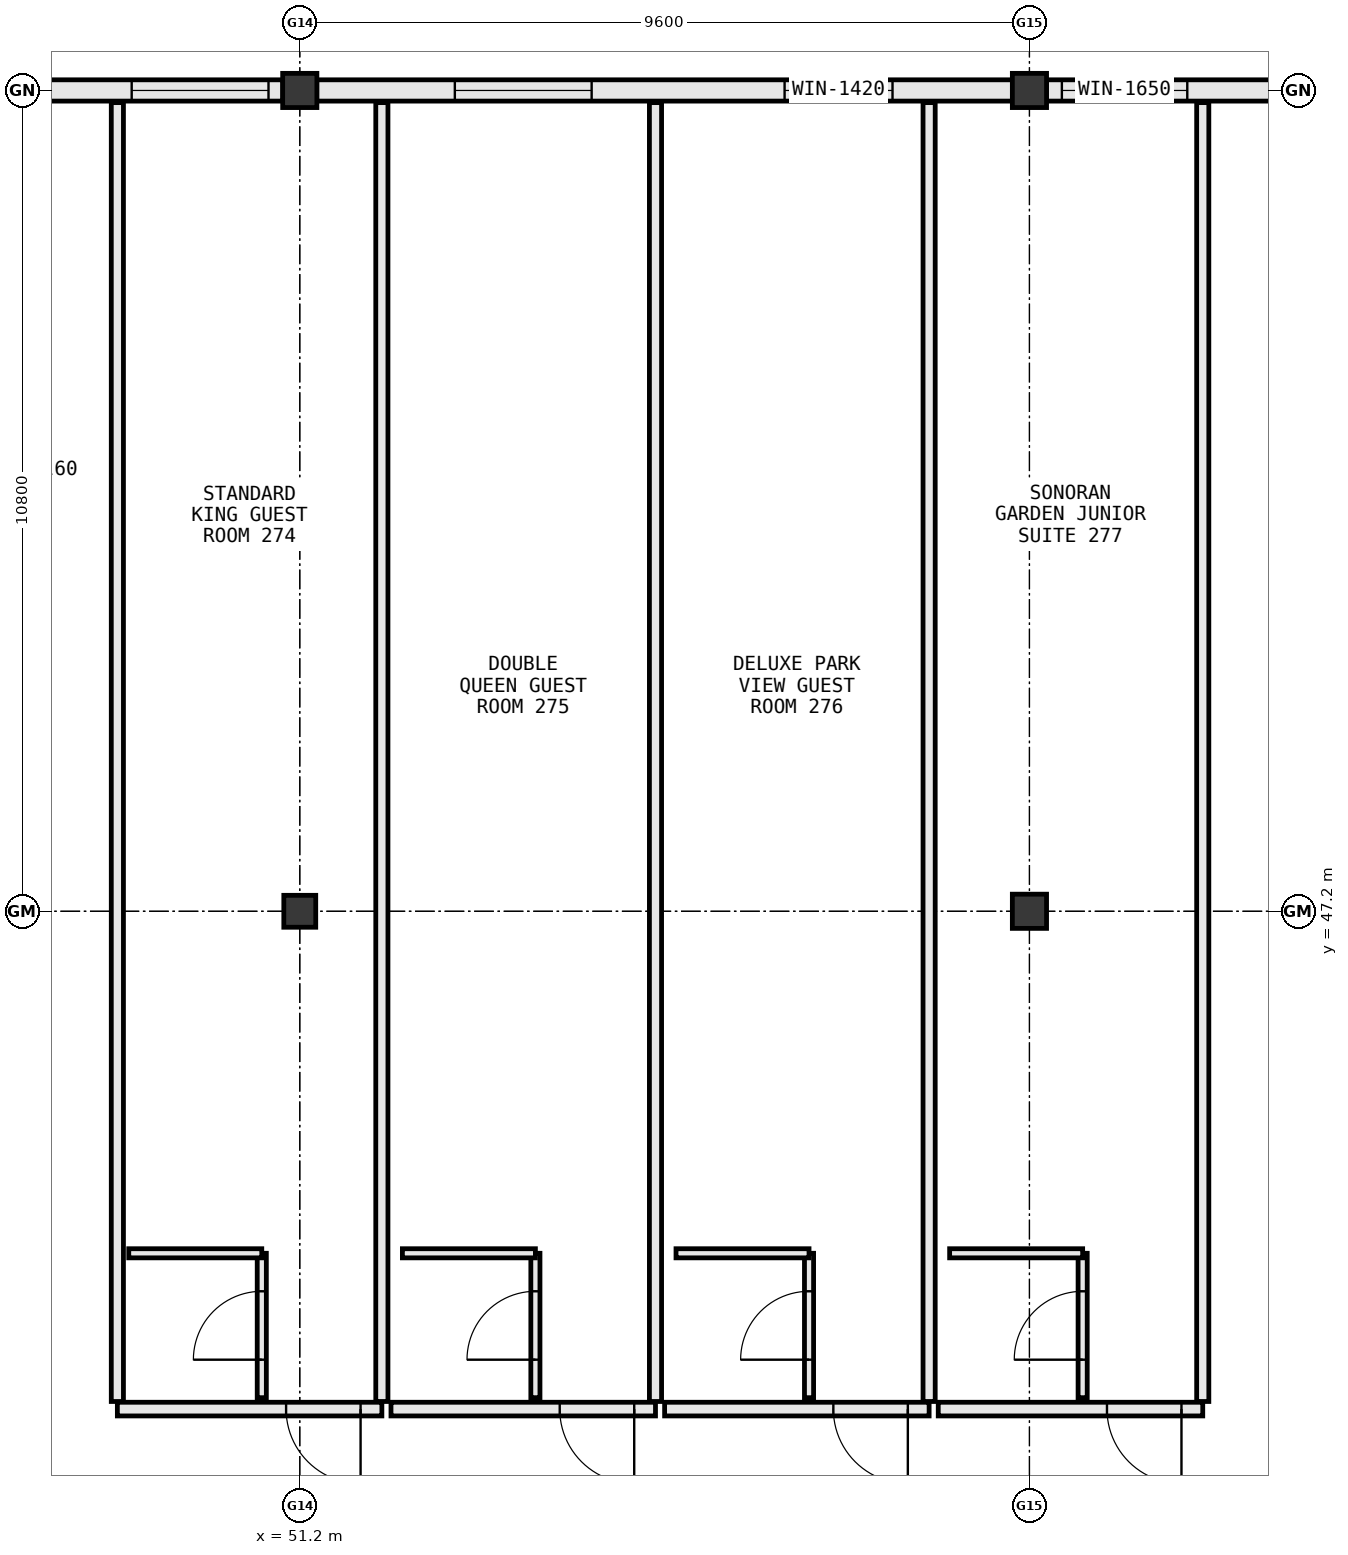
"""IFC4 building model, lengths in metres.
Left out: names, types, materials, properties, quantities, classifications, styles, units other than length and angle.
Written with IfcOpenShell. Run it as: python <this file> out.ifc"""

import sys

from ifc_helpers import new_model, si_unit, direction, frame, frame_2d, origin, origin_2d, place, context, subcontext, project, spatial, rectangle, extrude, element, fill, save


model = new_model("IFC4")
c1 = context("Model", 3, precision=1e-05, world=origin(), true_north=direction((0.0, 1.0)))
c2 = subcontext(c1, "Body", "Model", "MODEL_VIEW")
j1 = project(units=[si_unit("LENGTHUNIT", "METRE"), si_unit("PLANEANGLEUNIT", "RADIAN")], contexts=[c1])
p1 = place(None, origin())
s1 = spatial("IfcSite", under=j1, at=p1, CompositionType="ELEMENT")
p2 = place(p1, origin())
s2 = spatial("IfcBuilding", under=s1, at=p2, CompositionType="ELEMENT")
p3 = place(p2, frame((0.0, 0.0, 39.0)))
s3 = spatial("IfcBuildingStorey", under=s2, at=p3, CompositionType="ELEMENT", Elevation=39.0)
for number, where, z_axis, x_axis in (
    (1, (60.8, 47.2, 0.0), (0.0, 0.0, 1.0), (1.0, 0.0, 0.0)),
    (2, (60.8, 58.0, 0.0), (0.0, 0.0, 1.0), (1.0, 0.0, 0.0)),
):
    element("IfcColumn", number, at=place(p3, frame(where, z_axis=z_axis, x_axis=x_axis)), inside=s3, PredefinedType="COLUMN", context=c2, shape_type="SweptSolid", body=[
        extrude(rectangle(XDim=0.45, YDim=0.45, at=origin_2d()), origin(), (0.0, 0.0, 1.0), 3.8),
    ])
p4 = place(p3, frame((51.2, 47.2, 0.0), z_axis=(0.0, 0.0, 1.0), x_axis=(1.0, 0.0, 0.0)))
e3 = element("IfcColumn", 3, at=p4, inside=s3, PredefinedType="COLUMN", context=c2, shape_type="SweptSolid", body=[
    extrude(rectangle(XDim=0.42, YDim=0.42, at=origin_2d()), origin(), (0.0, 0.0, 1.0), 3.8),
])
p5 = place(p3, frame((51.2, 58.0, 0.0), z_axis=(0.0, 0.0, 1.0), x_axis=(1.0, 0.0, 0.0)))
e4 = element("IfcColumn", 4, at=p5, inside=s3, PredefinedType="COLUMN", context=c2, shape_type="SweptSolid", body=[
    extrude(rectangle(XDim=0.45, YDim=0.45, at=origin_2d()), origin(), (0.0, 0.0, 1.0), 3.8),
])
p6 = place(p3, frame((65.377, 58.0, 0.0), z_axis=(0.0, 0.0, 1.0), x_axis=(-1.0, 0.0, 0.0)))
e5 = element("IfcWall", 5, at=p6, inside=s3, PredefinedType="STANDARD", context=c2, shape_type="SweptSolid", body=[
    extrude(rectangle(XDim=4.354, YDim=0.28, at=frame_2d((2.177, 0.0))), origin(), (0.0, 0.0, 1.0), 2.88),
])
p7 = place(p6, frame((2.5, 0.0, 0.85)))
e6 = element("IfcOpeningElement", 6, at=p7, cuts=e5, PredefinedType="OPENING", context=c2, shape_type="SweptSolid", body=[
    extrude(rectangle(XDim=1.65, YDim=1.8, at=frame_2d((0.825, 0.9))), frame((0.0, 0.152, 0.0), z_axis=(0.0, -1.0, 0.0), x_axis=(1.0, 0.0, 0.0)), (0.0, 0.0, 1.0), 0.304),
])
p8 = place(p3, frame((60.577, 58.0, 0.0), z_axis=(0.0, 0.0, 1.0), x_axis=(-1.0, 0.0, 0.0)))
e7 = element("IfcWall", 7, at=p8, inside=s3, PredefinedType="STANDARD", context=c2, shape_type="SweptSolid", body=[
    extrude(rectangle(XDim=9.154, YDim=0.28, at=frame_2d((4.577, 0.0))), origin(), (0.0, 0.0, 1.0), 2.88),
])
p9 = place(p8, frame((1.579, 0.0, 0.85)))
e8 = element("IfcOpeningElement", 8, at=p9, cuts=e7, PredefinedType="OPENING", context=c2, shape_type="SweptSolid", body=[
    extrude(rectangle(XDim=1.42, YDim=1.7, at=frame_2d((0.71, 0.85))), frame((0.0, 0.152, 0.0), z_axis=(0.0, -1.0, 0.0), x_axis=(1.0, 0.0, 0.0)), (0.0, 0.0, 1.0), 0.304),
])
p10 = place(p8, frame((5.537, 0.0, 0.85)))
e9 = element("IfcOpeningElement", 9, at=p10, cuts=e7, PredefinedType="OPENING", context=c2, shape_type="SweptSolid", body=[
    extrude(rectangle(XDim=1.8, YDim=1.85, at=frame_2d((0.9, 0.925))), frame((0.0, 0.152, 0.0), z_axis=(0.0, -1.0, 0.0), x_axis=(1.0, 0.0, 0.0)), (0.0, 0.0, 1.0), 0.304),
])
p11 = place(p3, frame((50.977, 58.0, 0.0), z_axis=(0.0, 0.0, 1.0), x_axis=(-1.0, 0.0, 0.0)))
e10 = element("IfcWall", 10, at=p11, inside=s3, PredefinedType="STANDARD", context=c2, shape_type="SweptSolid", body=[
    extrude(rectangle(XDim=4.354, YDim=0.28, at=frame_2d((2.177, 0.0))), origin(), (0.0, 0.0, 1.0), 2.88),
])
p12 = place(p11, frame((0.188, 0.0, 0.85)))
e11 = element("IfcOpeningElement", 11, at=p12, cuts=e10, PredefinedType="OPENING", context=c2, shape_type="SweptSolid", body=[
    extrude(rectangle(XDim=1.8, YDim=1.85, at=frame_2d((0.9, 0.925))), frame((0.0, 0.152, 0.0), z_axis=(0.0, -1.0, 0.0), x_axis=(1.0, 0.0, 0.0)), (0.0, 0.0, 1.0), 0.304),
])
p13 = place(p3, frame((48.8, 40.65, 0.0), z_axis=(0.0, 0.0, 1.0), x_axis=(1.0, 0.0, 0.0)))
e12 = element("IfcWall", 12, at=p13, inside=s3, PredefinedType="PARTITIONING", context=c2, shape_type="SweptSolid", body=[
    extrude(rectangle(XDim=3.48, YDim=0.18, at=frame_2d((1.74, 0.0))), origin(), (0.0, 0.0, 1.0), 3.565),
])
p14 = place(p13, frame((2.22, 0.0, 0.0)))
e13 = element("IfcOpeningElement", 13, at=p14, cuts=e12, PredefinedType="OPENING", context=c2, shape_type="SweptSolid", body=[
    extrude(rectangle(XDim=0.98, YDim=2.18, at=frame_2d((0.49, 1.09))), frame((0.0, 0.102, 0.0), z_axis=(0.0, -1.0, 0.0), x_axis=(1.0, 0.0, 0.0)), (0.0, 0.0, 1.0), 0.204),
])
p15 = place(p3, frame((48.8, 40.75, 0.0), z_axis=(0.0, 0.0, 1.0), x_axis=(0.0, 1.0, 0.0)))
e14 = element("IfcWall", 14, at=p15, inside=s3, PredefinedType="PARTITIONING", context=c2, shape_type="SweptSolid", body=[
    extrude(rectangle(XDim=17.09, YDim=0.16, at=frame_2d((8.545, 0.0))), origin(), (0.0, 0.0, 1.0), 3.11),
])
p16 = place(p3, frame((52.28, 40.75, 0.0), z_axis=(0.0, 0.0, 1.0), x_axis=(0.0, 1.0, 0.0)))
e15 = element("IfcWall", 15, at=p16, inside=s3, PredefinedType="PARTITIONING", context=c2, shape_type="SweptSolid", body=[
    extrude(rectangle(XDim=17.09, YDim=0.16, at=frame_2d((8.545, 0.0))), origin(), (0.0, 0.0, 1.0), 3.565),
])
p17 = place(p3, frame((50.7, 40.8, 0.0), z_axis=(0.0, 0.0, 1.0), x_axis=(0.0, 1.0, 0.0)))
e16 = element("IfcWall", 16, at=p17, inside=s3, PredefinedType="PARTITIONING", context=c2, shape_type="SweptSolid", body=[
    extrude(rectangle(XDim=1.9, YDim=0.12, at=frame_2d((0.95, 0.0))), origin(), (0.0, 0.0, 1.0), 3.565),
])
p18 = place(p17, frame((0.5, 0.0, 0.0)))
e17 = element("IfcOpeningElement", 17, at=p18, cuts=e16, PredefinedType="OPENING", context=c2, shape_type="SweptSolid", body=[
    extrude(rectangle(XDim=0.9, YDim=2.15, at=frame_2d((0.45, 1.075))), frame((0.0, 0.072, 0.0), z_axis=(0.0, -1.0, 0.0), x_axis=(1.0, 0.0, 0.0)), (0.0, 0.0, 1.0), 0.144),
])
p19 = place(p3, frame((48.95, 42.7, 0.0), z_axis=(0.0, 0.0, 1.0), x_axis=(1.0, 0.0, 0.0)))
e18 = element("IfcWall", 18, at=p19, inside=s3, PredefinedType="PARTITIONING", context=c2, shape_type="SweptSolid", body=[
    extrude(rectangle(XDim=1.75, YDim=0.12, at=frame_2d((0.875, 0.0))), origin(), (0.0, 0.0, 1.0), 3.565),
])
p20 = place(p3, frame((52.4, 40.65, 0.0), z_axis=(0.0, 0.0, 1.0), x_axis=(1.0, 0.0, 0.0)))
e19 = element("IfcWall", 19, at=p20, inside=s3, PredefinedType="PARTITIONING", context=c2, shape_type="SweptSolid", body=[
    extrude(rectangle(XDim=3.48, YDim=0.18, at=frame_2d((1.74, 0.0))), origin(), (0.0, 0.0, 1.0), 3.565),
])
p21 = place(p20, frame((2.22, 0.0, 0.0)))
e20 = element("IfcOpeningElement", 20, at=p21, cuts=e19, PredefinedType="OPENING", context=c2, shape_type="SweptSolid", body=[
    extrude(rectangle(XDim=0.98, YDim=2.18, at=frame_2d((0.49, 1.09))), frame((0.0, 0.102, 0.0), z_axis=(0.0, -1.0, 0.0), x_axis=(1.0, 0.0, 0.0)), (0.0, 0.0, 1.0), 0.204),
])
p22 = place(p3, frame((55.88, 40.75, 0.0), z_axis=(0.0, 0.0, 1.0), x_axis=(0.0, 1.0, 0.0)))
e21 = element("IfcWall", 21, at=p22, inside=s3, PredefinedType="PARTITIONING", context=c2, shape_type="SweptSolid", body=[
    extrude(rectangle(XDim=17.09, YDim=0.16, at=frame_2d((8.545, 0.0))), origin(), (0.0, 0.0, 1.0), 3.565),
])
p23 = place(p3, frame((54.3, 40.8, 0.0), z_axis=(0.0, 0.0, 1.0), x_axis=(0.0, 1.0, 0.0)))
e22 = element("IfcWall", 22, at=p23, inside=s3, PredefinedType="PARTITIONING", context=c2, shape_type="SweptSolid", body=[
    extrude(rectangle(XDim=1.9, YDim=0.12, at=frame_2d((0.95, 0.0))), origin(), (0.0, 0.0, 1.0), 3.11),
])
p24 = place(p23, frame((0.5, 0.0, 0.0)))
e23 = element("IfcOpeningElement", 23, at=p24, cuts=e22, PredefinedType="OPENING", context=c2, shape_type="SweptSolid", body=[
    extrude(rectangle(XDim=0.9, YDim=2.15, at=frame_2d((0.45, 1.075))), frame((0.0, 0.072, 0.0), z_axis=(0.0, -1.0, 0.0), x_axis=(1.0, 0.0, 0.0)), (0.0, 0.0, 1.0), 0.144),
])
p25 = place(p3, frame((52.55, 42.7, 0.0), z_axis=(0.0, 0.0, 1.0), x_axis=(1.0, 0.0, 0.0)))
e24 = element("IfcWall", 24, at=p25, inside=s3, PredefinedType="PARTITIONING", context=c2, shape_type="SweptSolid", body=[
    extrude(rectangle(XDim=1.75, YDim=0.12, at=frame_2d((0.875, 0.0))), origin(), (0.0, 0.0, 1.0), 3.565),
])
p26 = place(p3, frame((56.0, 40.65, 0.0), z_axis=(0.0, 0.0, 1.0), x_axis=(1.0, 0.0, 0.0)))
e25 = element("IfcWall", 25, at=p26, inside=s3, PredefinedType="PARTITIONING", context=c2, shape_type="SweptSolid", body=[
    extrude(rectangle(XDim=3.48, YDim=0.18, at=frame_2d((1.74, 0.0))), origin(), (0.0, 0.0, 1.0), 3.565),
])
p27 = place(p26, frame((2.22, 0.0, 0.0)))
e26 = element("IfcOpeningElement", 26, at=p27, cuts=e25, PredefinedType="OPENING", context=c2, shape_type="SweptSolid", body=[
    extrude(rectangle(XDim=0.98, YDim=2.18, at=frame_2d((0.49, 1.09))), frame((0.0, 0.102, 0.0), z_axis=(0.0, -1.0, 0.0), x_axis=(1.0, 0.0, 0.0)), (0.0, 0.0, 1.0), 0.204),
])
p28 = place(p3, frame((59.48, 40.75, 0.0), z_axis=(0.0, 0.0, 1.0), x_axis=(0.0, 1.0, 0.0)))
e27 = element("IfcWall", 27, at=p28, inside=s3, PredefinedType="PARTITIONING", context=c2, shape_type="SweptSolid", body=[
    extrude(rectangle(XDim=17.09, YDim=0.16, at=frame_2d((8.545, 0.0))), origin(), (0.0, 0.0, 1.0), 3.565),
])
p29 = place(p3, frame((57.9, 40.8, 0.0), z_axis=(0.0, 0.0, 1.0), x_axis=(0.0, 1.0, 0.0)))
e28 = element("IfcWall", 28, at=p29, inside=s3, PredefinedType="PARTITIONING", context=c2, shape_type="SweptSolid", body=[
    extrude(rectangle(XDim=1.9, YDim=0.12, at=frame_2d((0.95, 0.0))), origin(), (0.0, 0.0, 1.0), 3.11),
])
p30 = place(p29, frame((0.5, 0.0, 0.0)))
e29 = element("IfcOpeningElement", 29, at=p30, cuts=e28, PredefinedType="OPENING", context=c2, shape_type="SweptSolid", body=[
    extrude(rectangle(XDim=0.9, YDim=2.15, at=frame_2d((0.45, 1.075))), frame((0.0, 0.072, 0.0), z_axis=(0.0, -1.0, 0.0), x_axis=(1.0, 0.0, 0.0)), (0.0, 0.0, 1.0), 0.144),
])
p31 = place(p3, frame((56.15, 42.7, 0.0), z_axis=(0.0, 0.0, 1.0), x_axis=(1.0, 0.0, 0.0)))
e30 = element("IfcWall", 30, at=p31, inside=s3, PredefinedType="PARTITIONING", context=c2, shape_type="SweptSolid", body=[
    extrude(rectangle(XDim=1.75, YDim=0.12, at=frame_2d((0.875, 0.0))), origin(), (0.0, 0.0, 1.0), 3.565),
])
p32 = place(p3, frame((59.6, 40.65, 0.0), z_axis=(0.0, 0.0, 1.0), x_axis=(1.0, 0.0, 0.0)))
e31 = element("IfcWall", 31, at=p32, inside=s3, PredefinedType="PARTITIONING", context=c2, shape_type="SweptSolid", body=[
    extrude(rectangle(XDim=3.48, YDim=0.18, at=frame_2d((1.74, 0.0))), origin(), (0.0, 0.0, 1.0), 3.565),
])
p33 = place(p32, frame((2.22, 0.0, 0.0)))
e32 = element("IfcOpeningElement", 32, at=p33, cuts=e31, PredefinedType="OPENING", context=c2, shape_type="SweptSolid", body=[
    extrude(rectangle(XDim=0.98, YDim=2.18, at=frame_2d((0.49, 1.09))), frame((0.0, 0.102, 0.0), z_axis=(0.0, -1.0, 0.0), x_axis=(1.0, 0.0, 0.0)), (0.0, 0.0, 1.0), 0.204),
])
p34 = place(p3, frame((63.08, 40.75, 0.0), z_axis=(0.0, 0.0, 1.0), x_axis=(0.0, 1.0, 0.0)))
e33 = element("IfcWall", 33, at=p34, inside=s3, PredefinedType="PARTITIONING", context=c2, shape_type="SweptSolid", body=[
    extrude(rectangle(XDim=17.09, YDim=0.16, at=frame_2d((8.545, 0.0))), origin(), (0.0, 0.0, 1.0), 3.565),
])
p35 = place(p3, frame((61.5, 40.8, 0.0), z_axis=(0.0, 0.0, 1.0), x_axis=(0.0, 1.0, 0.0)))
e34 = element("IfcWall", 34, at=p35, inside=s3, PredefinedType="PARTITIONING", context=c2, shape_type="SweptSolid", body=[
    extrude(rectangle(XDim=1.9, YDim=0.12, at=frame_2d((0.95, 0.0))), origin(), (0.0, 0.0, 1.0), 3.565),
])
p36 = place(p35, frame((0.5, 0.0, 0.0)))
e35 = element("IfcOpeningElement", 35, at=p36, cuts=e34, PredefinedType="OPENING", context=c2, shape_type="SweptSolid", body=[
    extrude(rectangle(XDim=0.9, YDim=2.15, at=frame_2d((0.45, 1.075))), frame((0.0, 0.072, 0.0), z_axis=(0.0, -1.0, 0.0), x_axis=(1.0, 0.0, 0.0)), (0.0, 0.0, 1.0), 0.144),
])
p37 = place(p3, frame((59.75, 42.7, 0.0), z_axis=(0.0, 0.0, 1.0), x_axis=(1.0, 0.0, 0.0)))
e36 = element("IfcWall", 36, at=p37, inside=s3, PredefinedType="PARTITIONING", context=c2, shape_type="SweptSolid", body=[
    extrude(rectangle(XDim=1.75, YDim=0.12, at=frame_2d((0.875, 0.0))), origin(), (0.0, 0.0, 1.0), 3.565),
])
p38 = place(p9, origin())
e37 = element("IfcWindow", 37, at=p38, inside=s3, PartitioningType="SINGLE_PANEL", PredefinedType="WINDOW", context=c2, shape_type="SweptSolid", body=[
    extrude(rectangle(XDim=1.42, YDim=1.7, at=frame_2d((0.71, 0.85))), frame((0.0, 0.03, 0.0), z_axis=(0.0, -1.0, 0.0), x_axis=(1.0, 0.0, 0.0)), (0.0, 0.0, 1.0), 0.06),
])
fill(e8, e37)
p39 = place(p12, origin())
e38 = element("IfcWindow", 38, at=p39, inside=s3, PartitioningType="SINGLE_PANEL", PredefinedType="WINDOW", context=c2, shape_type="SweptSolid", body=[
    extrude(rectangle(XDim=1.8, YDim=1.85, at=frame_2d((0.9, 0.925))), frame((0.0, 0.03, 0.0), z_axis=(0.0, -1.0, 0.0), x_axis=(1.0, 0.0, 0.0)), (0.0, 0.0, 1.0), 0.06),
])
fill(e11, e38)
p40 = place(p10, origin())
e39 = element("IfcWindow", 39, at=p40, inside=s3, PartitioningType="SINGLE_PANEL", PredefinedType="WINDOW", context=c2, shape_type="SweptSolid", body=[
    extrude(rectangle(XDim=1.8, YDim=1.85, at=frame_2d((0.9, 0.925))), frame((0.0, 0.03, 0.0), z_axis=(0.0, -1.0, 0.0), x_axis=(1.0, 0.0, 0.0)), (0.0, 0.0, 1.0), 0.06),
])
fill(e9, e39)
p41 = place(p7, origin())
e40 = element("IfcWindow", 40, at=p41, inside=s3, PartitioningType="SINGLE_PANEL", PredefinedType="WINDOW", context=c2, shape_type="SweptSolid", body=[
    extrude(rectangle(XDim=1.65, YDim=1.8, at=frame_2d((0.825, 0.9))), frame((0.0, 0.03, 0.0), z_axis=(0.0, -1.0, 0.0), x_axis=(1.0, 0.0, 0.0)), (0.0, 0.0, 1.0), 0.06),
])
fill(e6, e40)
p42 = place(p14, frame((0.98, 0.0, 0.0), z_axis=(0.0, 0.0, 1.0), x_axis=(-1.0, 0.0, 0.0)))
e41 = element("IfcDoor", 41, at=p42, inside=s3, OperationType="SINGLE_SWING_RIGHT", PredefinedType="DOOR", context=c2, shape_type="SweptSolid", body=[
    extrude(rectangle(XDim=0.98, YDim=2.18, at=frame_2d((0.49, 1.09))), frame((0.0, 0.025, 0.0), z_axis=(0.0, -1.0, 0.0), x_axis=(1.0, 0.0, 0.0)), (0.0, 0.0, 1.0), 0.05),
])
fill(e13, e41)
p43 = place(p18, origin())
e42 = element("IfcDoor", 42, at=p43, inside=s3, OperationType="SINGLE_SWING_LEFT", PredefinedType="DOOR", context=c2, shape_type="SweptSolid", body=[
    extrude(rectangle(XDim=0.9, YDim=2.15, at=frame_2d((0.45, 1.075))), frame((0.0, 0.025, 0.0), z_axis=(0.0, -1.0, 0.0), x_axis=(1.0, 0.0, 0.0)), (0.0, 0.0, 1.0), 0.05),
])
fill(e17, e42)
p44 = place(p21, frame((0.98, 0.0, 0.0), z_axis=(0.0, 0.0, 1.0), x_axis=(-1.0, 0.0, 0.0)))
e43 = element("IfcDoor", 43, at=p44, inside=s3, OperationType="SINGLE_SWING_RIGHT", PredefinedType="DOOR", context=c2, shape_type="SweptSolid", body=[
    extrude(rectangle(XDim=0.98, YDim=2.18, at=frame_2d((0.49, 1.09))), frame((0.0, 0.025, 0.0), z_axis=(0.0, -1.0, 0.0), x_axis=(1.0, 0.0, 0.0)), (0.0, 0.0, 1.0), 0.05),
])
fill(e20, e43)
p45 = place(p24, origin())
e44 = element("IfcDoor", 44, at=p45, inside=s3, OperationType="SINGLE_SWING_LEFT", PredefinedType="DOOR", context=c2, shape_type="SweptSolid", body=[
    extrude(rectangle(XDim=0.9, YDim=2.15, at=frame_2d((0.45, 1.075))), frame((0.0, 0.025, 0.0), z_axis=(0.0, -1.0, 0.0), x_axis=(1.0, 0.0, 0.0)), (0.0, 0.0, 1.0), 0.05),
])
fill(e23, e44)
p46 = place(p27, frame((0.98, 0.0, 0.0), z_axis=(0.0, 0.0, 1.0), x_axis=(-1.0, 0.0, 0.0)))
e45 = element("IfcDoor", 45, at=p46, inside=s3, OperationType="SINGLE_SWING_RIGHT", PredefinedType="DOOR", context=c2, shape_type="SweptSolid", body=[
    extrude(rectangle(XDim=0.98, YDim=2.18, at=frame_2d((0.49, 1.09))), frame((0.0, 0.025, 0.0), z_axis=(0.0, -1.0, 0.0), x_axis=(1.0, 0.0, 0.0)), (0.0, 0.0, 1.0), 0.05),
])
fill(e26, e45)
p47 = place(p30, origin())
e46 = element("IfcDoor", 46, at=p47, inside=s3, OperationType="SINGLE_SWING_LEFT", PredefinedType="DOOR", context=c2, shape_type="SweptSolid", body=[
    extrude(rectangle(XDim=0.9, YDim=2.15, at=frame_2d((0.45, 1.075))), frame((0.0, 0.025, 0.0), z_axis=(0.0, -1.0, 0.0), x_axis=(1.0, 0.0, 0.0)), (0.0, 0.0, 1.0), 0.05),
])
fill(e29, e46)
p48 = place(p33, frame((0.98, 0.0, 0.0), z_axis=(0.0, 0.0, 1.0), x_axis=(-1.0, 0.0, 0.0)))
e47 = element("IfcDoor", 47, at=p48, inside=s3, OperationType="SINGLE_SWING_RIGHT", PredefinedType="DOOR", context=c2, shape_type="SweptSolid", body=[
    extrude(rectangle(XDim=0.98, YDim=2.18, at=frame_2d((0.49, 1.09))), frame((0.0, 0.025, 0.0), z_axis=(0.0, -1.0, 0.0), x_axis=(1.0, 0.0, 0.0)), (0.0, 0.0, 1.0), 0.05),
])
fill(e32, e47)
p49 = place(p36, origin())
e48 = element("IfcDoor", 48, at=p49, inside=s3, OperationType="SINGLE_SWING_LEFT", PredefinedType="DOOR", context=c2, shape_type="SweptSolid", body=[
    extrude(rectangle(XDim=0.9, YDim=2.15, at=frame_2d((0.45, 1.075))), frame((0.0, 0.025, 0.0), z_axis=(0.0, -1.0, 0.0), x_axis=(1.0, 0.0, 0.0)), (0.0, 0.0, 1.0), 0.05),
])
fill(e35, e48)
save(model, sys.argv[1])
